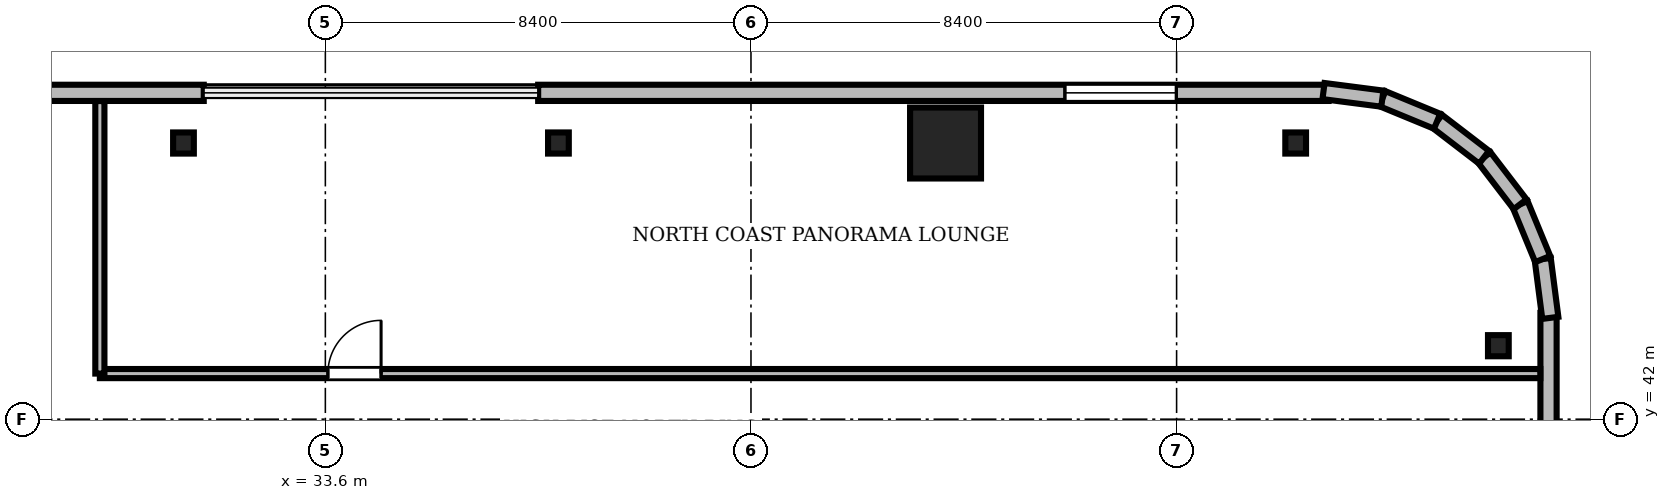
"""IFC4 building model, lengths in metres.
Left out: names, types, materials, properties, quantities, classifications, styles, units other than length and angle.
Written with IfcOpenShell. Run it as: python <this file> out.ifc"""

import sys

from ifc_helpers import new_model, si_unit, direction, frame, frame_2d, origin, origin_2d, place, context, subcontext, project, spatial, rectangle, i_section, extrude, source, transform, mapped, element, fill, save


model = new_model("IFC4")
c1 = context("Model", 3, precision=1e-05, world=origin(), true_north=direction((0.0, 1.0)))
c2 = subcontext(c1, "Body", "Model", "MODEL_VIEW")
j1 = project(units=[si_unit("LENGTHUNIT", "METRE"), si_unit("PLANEANGLEUNIT", "RADIAN")], contexts=[c1])
p1 = place(None, origin())
s1 = spatial("IfcSite", under=j1, at=p1, CompositionType="ELEMENT")
p2 = place(p1, origin())
s2 = spatial("IfcBuilding", under=s1, at=p2, CompositionType="ELEMENT")
p3 = place(p2, frame((0.0, 0.0, 229.8)))
s3 = spatial("IfcBuildingStorey", under=s2, at=p3, CompositionType="ELEMENT", Elevation=229.8)
m1 = source(origin(), c2, "Body", "SweptSolid", [
    extrude(rectangle(XDim=1.4, YDim=1.4, at=origin_2d()), origin(), (0.0, 0.0, 1.0), 3.53),
])
p4 = place(p3, frame((45.84, 47.45, 0.0), z_axis=(0.0, 0.0, 1.0), x_axis=(1.0, 0.0, 0.0)))
e1 = element("IfcColumn", 1, at=p4, inside=s3, PredefinedType="COLUMN", context=c2, shape_type="MappedRepresentation", body=[
    mapped(m1, transform((0.0, 0.0, 0.0), scale=1.0)),
])
m2 = source(origin(), c2, "Body", "SweptSolid", [
    extrude(i_section(OverallWidth=0.409, OverallDepth=0.417, WebThickness=0.021, FlangeThickness=0.033, FilletRadius=0.015, at=origin_2d()), origin(), (0.0, 0.0, 1.0), 3.53),
])
for number, where, z_axis, x_axis in (
    (2, (56.75, 43.45, 0.0), (0.0, 0.0, 1.0), (1.0, 0.0, 0.0)),
    (3, (52.75, 47.45, 0.0), (0.0, 0.0, 1.0), (1.0, 0.0, 0.0)),
    (4, (38.2, 47.45, 0.0), (0.0, 0.0, 1.0), (1.0, 0.0, 0.0)),
    (5, (30.8, 47.45, 0.0), (0.0, 0.0, 1.0), (1.0, 0.0, 0.0)),
):
    element("IfcColumn", number, at=place(p3, frame(where, z_axis=z_axis, x_axis=x_axis)), inside=s3, PredefinedType="COLUMN", context=c2, shape_type="MappedRepresentation", body=[
        mapped(m2, transform((0.0, 0.0, 0.0), scale=1.0)),
    ])
m3 = source(origin(), c2, "Body", "SweptSolid", [
    extrude(rectangle(XDim=15.6, YDim=0.32, at=frame_2d((7.8, 0.0))), origin(), (0.0, 0.0, 1.0), 3.53),
])
p5 = place(p3, frame((53.4, 48.44, 0.0), z_axis=(0.0, 0.0, 1.0), x_axis=(-1.0, 0.0, 0.0)))
e6 = element("IfcWall", 6, at=p5, inside=s3, PredefinedType="SOLIDWALL", context=c2, shape_type="MappedRepresentation", body=[
    mapped(m3, transform((0.0, 0.0, 0.0), scale=1.0)),
])
m4 = source(origin(), c2, "Body", "SweptSolid", [
    extrude(rectangle(XDim=2.2, YDim=2.4, at=frame_2d((1.1, 1.2))), frame((0.0, 0.17, 0.0), z_axis=(0.0, -1.0, 0.0), x_axis=(1.0, 0.0, 0.0)), (0.0, 0.0, 1.0), 0.34),
])
p6 = place(p5, frame((3.005, 0.0, 0.72)))
e7 = element("IfcOpeningElement", 7, at=p6, cuts=e6, PredefinedType="OPENING", context=c2, shape_type="MappedRepresentation", body=[
    mapped(m4, transform((0.0, 0.0, 0.0), scale=1.0)),
])
p7 = place(p3, frame((31.2, 48.44, 0.0), z_axis=(0.0, 0.0, 1.0), x_axis=(-1.0, 0.0, 0.0)))
e8 = element("IfcWall", 8, at=p7, inside=s3, PredefinedType="SOLIDWALL", context=c2, shape_type="MappedRepresentation", body=[
    mapped(m3, transform((0.0, 0.0, 0.0), scale=1.0)),
])
m5 = source(origin(), c2, "Body", "SweptSolid", [
    extrude(rectangle(XDim=1.4, YDim=2.3, at=frame_2d((0.7, 1.15))), frame((0.0, 0.17, 0.0), z_axis=(0.0, -1.0, 0.0), x_axis=(1.0, 0.0, 0.0)), (0.0, 0.0, 1.0), 0.34),
])
p8 = place(p7, frame((4.59, 0.0, 0.0)))
e9 = element("IfcOpeningElement", 9, at=p8, cuts=e8, PredefinedType="OPENING", context=c2, shape_type="MappedRepresentation", body=[
    mapped(m5, transform((0.0, 0.0, 0.0), scale=1.0)),
])
p9 = place(p7, frame((10.395, 0.0, 0.72)))
e10 = element("IfcOpeningElement", 10, at=p9, cuts=e8, PredefinedType="OPENING", context=c2, shape_type="MappedRepresentation", body=[
    mapped(m4, transform((0.0, 0.0, 0.0), scale=1.0)),
])
m6 = source(origin(), c2, "Body", "SweptSolid", [
    extrude(rectangle(XDim=15.6, YDim=0.32, at=frame_2d((7.8, 0.0))), origin(), (0.0, 0.0, 1.0), 3.53),
])
p10 = place(p3, frame((57.74, 28.5, 0.0), z_axis=(0.0, 0.0, 1.0), x_axis=(0.0, 1.0, 0.0)))
e11 = element("IfcWall", 11, at=p10, inside=s3, PredefinedType="SOLIDWALL", context=c2, shape_type="MappedRepresentation", body=[
    mapped(m6, transform((0.0, 0.0, 0.0), scale=1.0)),
])
p11 = place(p10, frame((10.395, 0.0, 0.72)))
e12 = element("IfcOpeningElement", 12, at=p11, cuts=e11, PredefinedType="OPENING", context=c2, shape_type="MappedRepresentation", body=[
    mapped(m4, transform((0.0, 0.0, 0.0), scale=1.0)),
])
m7 = source(origin(), c2, "Body", "SweptSolid", [
    extrude(rectangle(XDim=1.17, YDim=0.32, at=frame_2d((0.585, 0.0))), origin(), (0.0, 0.0, 1.0), 3.53),
])
p12 = place(p3, frame((57.776, 44.0, 0.0), z_axis=(0.0, 0.0, 1.0), x_axis=(-0.128295670475, 0.991735963317, 0.0)))
e13 = element("IfcWall", 13, at=p12, inside=s3, PredefinedType="SOLIDWALL", context=c2, shape_type="MappedRepresentation", body=[
    mapped(m7, transform((0.0, 0.0, 0.0), scale=1.0)),
])
m8 = source(origin(), c2, "Body", "SweptSolid", [
    extrude(rectangle(XDim=1.169, YDim=0.32, at=frame_2d((0.584, 0.0))), origin(), (0.0, 0.0, 1.0), 3.53),
])
p13 = place(p3, frame((57.625, 45.16, 0.0), z_axis=(0.0, 0.0, 1.0), x_axis=(-0.381054331552, 0.924552646638, 0.0)))
e14 = element("IfcWall", 14, at=p13, inside=s3, PredefinedType="SOLIDWALL", context=c2, shape_type="MappedRepresentation", body=[
    mapped(m8, transform((0.0, 0.0, 0.0), scale=1.0)),
])
m9 = source(origin(), c2, "Body", "SweptSolid", [
    extrude(rectangle(XDim=1.169, YDim=0.32, at=frame_2d((0.584, 0.0))), origin(), (0.0, 0.0, 1.0), 3.53),
])
p14 = place(p3, frame((57.18, 46.241, 0.0), z_axis=(0.0, 0.0, 1.0), x_axis=(-0.608387696831, 0.793639975269, 0.0)))
e15 = element("IfcWall", 15, at=p14, inside=s3, PredefinedType="SOLIDWALL", context=c2, shape_type="MappedRepresentation", body=[
    mapped(m9, transform((0.0, 0.0, 0.0), scale=1.0)),
])
m10 = source(origin(), c2, "Body", "SweptSolid", [
    extrude(rectangle(XDim=1.169, YDim=0.32, at=frame_2d((0.584, 0.0))), origin(), (0.0, 0.0, 1.0), 3.53),
])
p15 = place(p3, frame((56.469, 47.169, 0.0), z_axis=(0.0, 0.0, 1.0), x_axis=(-0.793663520347, 0.608356981114, 0.0)))
e16 = element("IfcWall", 16, at=p15, inside=s3, PredefinedType="SOLIDWALL", context=c2, shape_type="MappedRepresentation", body=[
    mapped(m10, transform((0.0, 0.0, 0.0), scale=1.0)),
])
p16 = place(p3, frame((55.541, 47.88, 0.0), z_axis=(0.0, 0.0, 1.0), x_axis=(-0.924552646638, 0.381054331552, 0.0)))
e17 = element("IfcWall", 17, at=p16, inside=s3, PredefinedType="SOLIDWALL", context=c2, shape_type="MappedRepresentation", body=[
    mapped(m8, transform((0.0, 0.0, 0.0), scale=1.0)),
])
p17 = place(p3, frame((54.46, 48.325, 0.0), z_axis=(0.0, 0.0, 1.0), x_axis=(-0.991735963317, 0.128295670475, 0.0)))
e18 = element("IfcWall", 18, at=p17, inside=s3, PredefinedType="SOLIDWALL", context=c2, shape_type="MappedRepresentation", body=[
    mapped(m7, transform((0.0, 0.0, 0.0), scale=1.0)),
])
m11 = source(origin(), c2, "Body", "SweptSolid", [
    extrude(rectangle(XDim=28.428, YDim=0.18, at=frame_2d((14.214, 0.0))), origin(), (0.0, 0.0, 1.0), 2.772),
])
p18 = place(p3, frame((29.15, 42.9, 0.0), z_axis=(0.0, 0.0, 1.0), x_axis=(1.0, 0.0, 0.0)))
e19 = element("IfcWall", 19, at=p18, inside=s3, PredefinedType="PARTITIONING", context=c2, shape_type="MappedRepresentation", body=[
    mapped(m11, transform((0.0, 0.0, 0.0), scale=1.0)),
])
m12 = source(origin(), c2, "Body", "SweptSolid", [
    extrude(rectangle(XDim=1.05, YDim=2.2, at=frame_2d((0.525, 1.1))), frame((0.0, 0.1, 0.0), z_axis=(0.0, -1.0, 0.0), x_axis=(1.0, 0.0, 0.0)), (0.0, 0.0, 1.0), 0.2),
])
p19 = place(p18, frame((4.5, 0.0, 0.0)))
e20 = element("IfcOpeningElement", 20, at=p19, cuts=e19, PredefinedType="OPENING", context=c2, shape_type="MappedRepresentation", body=[
    mapped(m12, transform((0.0, 0.0, 0.0), scale=1.0)),
])
m13 = source(origin(), c2, "Body", "SweptSolid", [
    extrude(rectangle(XDim=5.378, YDim=0.18, at=frame_2d((2.689, 0.0))), origin(), (0.0, 0.0, 1.0), 2.772),
])
p20 = place(p3, frame((29.15, 42.9, 0.0), z_axis=(0.0, 0.0, 1.0), x_axis=(0.0, 1.0, 0.0)))
e21 = element("IfcWall", 21, at=p20, inside=s3, PredefinedType="PARTITIONING", context=c2, shape_type="MappedRepresentation", body=[
    mapped(m13, transform((0.0, 0.0, 0.0), scale=1.0)),
])
m14 = source(origin(), c2, "Body", "SweptSolid", [
    extrude(rectangle(XDim=2.2, YDim=2.4, at=frame_2d((1.1, 1.2))), frame((0.0, 0.03, 0.0), z_axis=(0.0, -1.0, 0.0), x_axis=(1.0, 0.0, 0.0)), (0.0, 0.0, 1.0), 0.06),
])
p21 = place(p6, origin())
e22 = element("IfcWindow", 22, at=p21, inside=s3, PartitioningType="SINGLE_PANEL", PredefinedType="WINDOW", context=c2, shape_type="MappedRepresentation", body=[
    mapped(m14, transform((0.0, 0.0, 0.0), scale=1.0)),
])
fill(e7, e22)
m15 = source(origin(), c2, "Body", "SweptSolid", [
    extrude(rectangle(XDim=1.05, YDim=2.2, at=frame_2d((0.525, 1.1))), frame((0.0, 0.025, 0.0), z_axis=(0.0, -1.0, 0.0), x_axis=(1.0, 0.0, 0.0)), (0.0, 0.0, 1.0), 0.05),
])
p22 = place(p19, origin())
e23 = element("IfcDoor", 23, at=p22, inside=s3, OperationType="SINGLE_SWING_RIGHT", PredefinedType="DOOR", context=c2, shape_type="MappedRepresentation", body=[
    mapped(m15, transform((0.0, 0.0, 0.0), scale=1.0)),
])
fill(e20, e23)
save(model, sys.argv[1])
